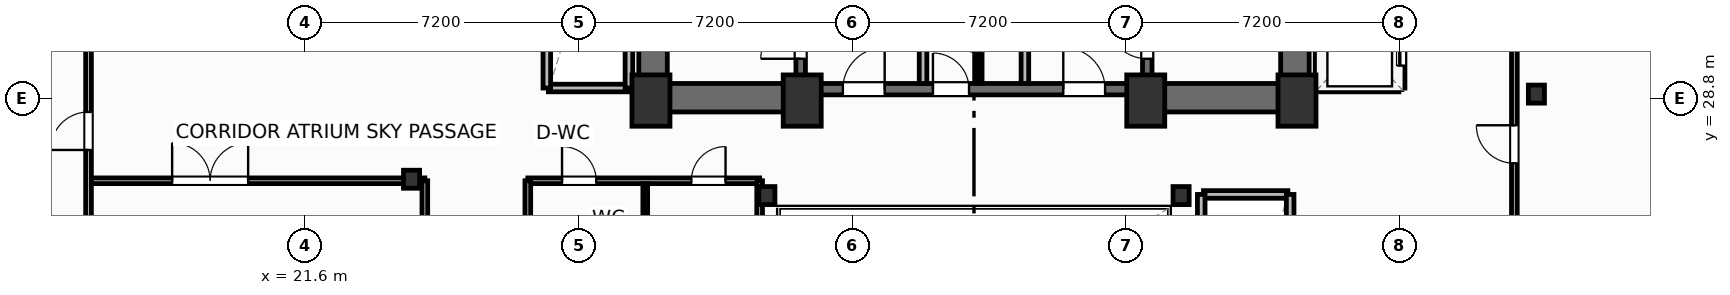
"""IFC4 building model, lengths in metres.
Left out: names, types, materials, properties, quantities, classifications, styles, units other than length and angle.
Written with IfcOpenShell. Run it as: python <this file> out.ifc"""

import sys

from ifc_helpers import new_model, si_unit, direction, frame, frame_2d, origin, origin_2d, place, context, subcontext, project, spatial, rectangle, i_section, extrude, element, fill, save


model = new_model("IFC4")
c1 = context("Model", 3, precision=1e-05, world=origin(), true_north=direction((0.0, 1.0)))
c2 = subcontext(c1, "Body", "Model", "MODEL_VIEW")
j1 = project(units=[si_unit("LENGTHUNIT", "METRE"), si_unit("PLANEANGLEUNIT", "RADIAN")], contexts=[c1])
p1 = place(None, origin())
s1 = spatial("IfcSite", under=j1, at=p1, CompositionType="ELEMENT")
p2 = place(p1, origin())
s2 = spatial("IfcBuilding", under=s1, at=p2, CompositionType="ELEMENT")
p3 = place(p2, frame((0.0, 0.0, 116.9)))
s3 = spatial("IfcBuildingStorey", under=s2, at=p3, CompositionType="ELEMENT", Elevation=116.9)
for number, where, z_axis, x_axis in (
    (1, (30.7, 28.75, 0.0), (0.0, 0.0, 1.0), (1.0, 0.0, 0.0)),
    (2, (34.68, 28.75, 0.0), (0.0, 0.0, 1.0), (1.0, 0.0, 0.0)),
    (3, (43.72, 28.75, 0.0), (0.0, 0.0, 1.0), (1.0, 0.0, 0.0)),
    (4, (47.7, 28.75, 0.0), (0.0, 0.0, 1.0), (1.0, 0.0, 0.0)),
):
    element("IfcColumn", number, at=place(p3, frame(where, z_axis=z_axis, x_axis=x_axis)), inside=s3, PredefinedType="COLUMN", context=c2, shape_type="SweptSolid", body=[
        extrude(rectangle(XDim=1.0, YDim=1.35, at=origin_2d()), origin(), (0.0, 0.0, 1.0), 4.8),
    ])
for number, where, z_axis, x_axis in (
    (5, (33.75, 26.25, 0.0), (0.0, 0.0, 1.0), (1.0, 0.0, 0.0)),
    (6, (44.65, 26.25, 0.0), (0.0, 0.0, 1.0), (1.0, 0.0, 0.0)),
    (7, (24.4, 26.68, 0.0), (0.0, 0.0, 1.0), (1.0, 0.0, 0.0)),
    (8, (54.0, 28.92, 0.0), (0.0, 0.0, 1.0), (1.0, 0.0, 0.0)),
):
    element("IfcColumn", number, at=place(p3, frame(where, z_axis=z_axis, x_axis=x_axis)), inside=s3, PredefinedType="COLUMN", context=c2, shape_type="SweptSolid", body=[
        extrude(i_section(OverallWidth=0.424, OverallDepth=0.474, WebThickness=0.048, FlangeThickness=0.077, FilletRadius=0.025, at=origin_2d()), origin(), (0.0, 0.0, 1.0), 4.8),
    ])
for number, where, z_axis, x_axis in (
    (9, (30.755, 29.2, 0.0), (0.0, 0.0, 1.0), (0.0, 1.0, 0.0)),
    (10, (47.645, 29.2, 0.0), (0.0, 0.0, 1.0), (0.0, 1.0, 0.0)),
):
    element("IfcWall", number, at=place(p3, frame(where, z_axis=z_axis, x_axis=x_axis)), inside=s3, PredefinedType="SHEAR", context=c2, shape_type="SweptSolid", body=[
        extrude(rectangle(XDim=9.22, YDim=0.75, at=frame_2d((4.61, 0.0))), origin(), (0.0, 0.0, 1.0), 4.55),
    ])
p4 = place(p3, frame((30.38, 28.825, 0.0), z_axis=(0.0, 0.0, 1.0), x_axis=(1.0, 0.0, 0.0)))
e11 = element("IfcWall", 11, at=p4, inside=s3, PredefinedType="SHEAR", context=c2, shape_type="SweptSolid", body=[
    extrude(rectangle(XDim=4.42, YDim=0.75, at=frame_2d((2.21, 0.0))), origin(), (0.0, 0.0, 1.0), 4.55),
])
p5 = place(p3, frame((43.6, 28.825, 0.0), z_axis=(0.0, 0.0, 1.0), x_axis=(1.0, 0.0, 0.0)))
e12 = element("IfcWall", 12, at=p5, inside=s3, PredefinedType="SHEAR", context=c2, shape_type="SweptSolid", body=[
    extrude(rectangle(XDim=4.42, YDim=0.75, at=frame_2d((2.21, 0.0))), origin(), (0.0, 0.0, 1.0), 4.55),
])
p6 = place(p3, frame((34.8, 29.05, 0.0), z_axis=(0.0, 0.0, 1.0), x_axis=(1.0, 0.0, 0.0)))
e13 = element("IfcWall", 13, at=p6, inside=s3, PredefinedType="SHEAR", context=c2, shape_type="SweptSolid", body=[
    extrude(rectangle(XDim=8.8, YDim=0.3, at=frame_2d((4.4, 0.0))), origin(), (0.0, 0.0, 1.0), 4.55),
])
p7 = place(p6, frame((0.95, 0.0, 0.0)))
e14 = element("IfcOpeningElement", 14, at=p7, cuts=e13, PredefinedType="OPENING", context=c2, shape_type="SweptSolid", body=[
    extrude(rectangle(XDim=1.1, YDim=2.15, at=frame_2d((0.55, 1.075))), frame((0.0, 0.16, 0.0), z_axis=(0.0, -1.0, 0.0), x_axis=(1.0, 0.0, 0.0)), (0.0, 0.0, 1.0), 0.32),
])
p8 = place(p6, frame((6.75, 0.0, 0.0)))
e15 = element("IfcOpeningElement", 15, at=p8, cuts=e13, PredefinedType="OPENING", context=c2, shape_type="SweptSolid", body=[
    extrude(rectangle(XDim=1.1, YDim=2.15, at=frame_2d((0.55, 1.075))), frame((0.0, 0.16, 0.0), z_axis=(0.0, -1.0, 0.0), x_axis=(1.0, 0.0, 0.0)), (0.0, 0.0, 1.0), 0.32),
])
p9 = place(p6, frame((3.32, 0.0, 0.0)))
e16 = element("IfcOpeningElement", 16, at=p9, cuts=e13, PredefinedType="OPENING", context=c2, shape_type="SweptSolid", body=[
    extrude(rectangle(XDim=0.95, YDim=2.15, at=frame_2d((0.475, 1.075))), frame((0.0, 0.16, 0.0), z_axis=(0.0, -1.0, 0.0), x_axis=(1.0, 0.0, 0.0)), (0.0, 0.0, 1.0), 0.32),
])
p10 = place(p3, frame((34.64, 29.2, 0.0), z_axis=(0.0, 0.0, 1.0), x_axis=(0.0, 1.0, 0.0)))
e17 = element("IfcWall", 17, at=p10, inside=s3, PredefinedType="SHEAR", context=c2, shape_type="SweptSolid", body=[
    extrude(rectangle(XDim=9.22, YDim=0.25, at=frame_2d((4.61, 0.0))), origin(), (0.0, 0.0, 1.0), 4.55),
])
p11 = place(p10, frame((0.65, 0.0, 0.0)))
e18 = element("IfcOpeningElement", 18, at=p11, cuts=e17, PredefinedType="OPENING", context=c2, shape_type="SweptSolid", body=[
    extrude(rectangle(XDim=1.05, YDim=2.15, at=frame_2d((0.525, 1.075))), frame((0.0, 0.135, 0.0), z_axis=(0.0, -1.0, 0.0), x_axis=(1.0, 0.0, 0.0)), (0.0, 0.0, 1.0), 0.27),
])
p12 = place(p3, frame((43.76, 29.2, 0.0), z_axis=(0.0, 0.0, 1.0), x_axis=(0.0, 1.0, 0.0)))
e19 = element("IfcWall", 19, at=p12, inside=s3, PredefinedType="SHEAR", context=c2, shape_type="SweptSolid", body=[
    extrude(rectangle(XDim=9.22, YDim=0.25, at=frame_2d((4.61, 0.0))), origin(), (0.0, 0.0, 1.0), 4.55),
])
p13 = place(p12, frame((0.65, 0.0, 0.0)))
e20 = element("IfcOpeningElement", 20, at=p13, cuts=e19, PredefinedType="OPENING", context=c2, shape_type="SweptSolid", body=[
    extrude(rectangle(XDim=1.05, YDim=2.15, at=frame_2d((0.525, 1.075))), frame((0.0, 0.135, 0.0), z_axis=(0.0, -1.0, 0.0), x_axis=(1.0, 0.0, 0.0)), (0.0, 0.0, 1.0), 0.27),
])
p14 = place(p3, frame((27.46, 26.64, 0.0), z_axis=(0.0, 0.0, 1.0), x_axis=(1.0, 0.0, 0.0)))
e21 = element("IfcWall", 21, at=p14, inside=s3, PredefinedType="PARTITIONING", context=c2, shape_type="SweptSolid", body=[
    extrude(rectangle(XDim=6.1, YDim=0.15, at=frame_2d((3.05, 0.0))), origin(), (0.0, 0.0, 1.0), 3.762),
])
p15 = place(p14, frame((0.9, 0.0, 0.0)))
e22 = element("IfcOpeningElement", 22, at=p15, cuts=e21, PredefinedType="OPENING", context=c2, shape_type="SweptSolid", body=[
    extrude(rectangle(XDim=0.9, YDim=2.05, at=frame_2d((0.45, 1.025))), frame((0.0, 0.085, 0.0), z_axis=(0.0, -1.0, 0.0), x_axis=(1.0, 0.0, 0.0)), (0.0, 0.0, 1.0), 0.17),
])
p16 = place(p14, frame((4.303, 0.0, 0.0)))
e23 = element("IfcOpeningElement", 23, at=p16, cuts=e21, PredefinedType="OPENING", context=c2, shape_type="SweptSolid", body=[
    extrude(rectangle(XDim=0.9, YDim=2.05, at=frame_2d((0.45, 1.025))), frame((0.0, 0.085, 0.0), z_axis=(0.0, -1.0, 0.0), x_axis=(1.0, 0.0, 0.0)), (0.0, 0.0, 1.0), 0.17),
])
p17 = place(p3, frame((30.55, 19.38, 0.0), z_axis=(0.0, 0.0, 1.0), x_axis=(0.0, 1.0, 0.0)))
e24 = element("IfcWall", 24, at=p17, inside=s3, PredefinedType="PARTITIONING", context=c2, shape_type="SweptSolid", body=[
    extrude(rectangle(XDim=7.18, YDim=0.125, at=frame_2d((3.59, 0.0))), origin(), (0.0, 0.0, 1.0), 4.55),
])
p18 = place(p3, frame((27.46, 19.3, 0.0), z_axis=(0.0, 0.0, 1.0), x_axis=(0.0, 1.0, 0.0)))
e25 = element("IfcWall", 25, at=p18, inside=s3, PredefinedType="PARTITIONING", context=c2, shape_type="SweptSolid", body=[
    extrude(rectangle(XDim=7.34, YDim=0.15, at=frame_2d((3.67, 0.0))), origin(), (0.0, 0.0, 1.0), 4.55),
])
p19 = place(p3, frame((33.56, 19.3, 0.0), z_axis=(0.0, 0.0, 1.0), x_axis=(0.0, 1.0, 0.0)))
e26 = element("IfcWall", 26, at=p19, inside=s3, PredefinedType="PARTITIONING", context=c2, shape_type="SweptSolid", body=[
    extrude(rectangle(XDim=7.34, YDim=0.15, at=frame_2d((3.67, 0.0))), origin(), (0.0, 0.0, 1.0), 3.924),
])
p20 = place(p3, frame((15.9, 26.64, 0.0), z_axis=(0.0, 0.0, 1.0), x_axis=(1.0, 0.0, 0.0)))
e27 = element("IfcWall", 27, at=p20, inside=s3, PredefinedType="PARTITIONING", context=c2, shape_type="SweptSolid", body=[
    extrude(rectangle(XDim=8.85, YDim=0.15, at=frame_2d((4.425, 0.0))), origin(), (0.0, 0.0, 1.0), 3.762),
])
p21 = place(p20, frame((2.2, 0.0, 0.0)))
e28 = element("IfcOpeningElement", 28, at=p21, cuts=e27, PredefinedType="OPENING", context=c2, shape_type="SweptSolid", body=[
    extrude(rectangle(XDim=2.0, YDim=2.05, at=frame_2d((1.0, 1.025))), frame((0.0, 0.085, 0.0), z_axis=(0.0, -1.0, 0.0), x_axis=(1.0, 0.0, 0.0)), (0.0, 0.0, 1.0), 0.17),
])
p22 = place(p3, frame((24.75, 19.3, 0.0), z_axis=(0.0, 0.0, 1.0), x_axis=(0.0, 1.0, 0.0)))
e29 = element("IfcWall", 29, at=p22, inside=s3, PredefinedType="PARTITIONING", context=c2, shape_type="SweptSolid", body=[
    extrude(rectangle(XDim=7.34, YDim=0.15, at=frame_2d((3.67, 0.0))), origin(), (0.0, 0.0, 1.0), 4.55),
])
p23 = place(p3, frame((15.9, 6.91, 0.0), z_axis=(0.0, 0.0, 1.0), x_axis=(0.0, 1.0, 0.0)))
e30 = element("IfcWall", 30, at=p23, inside=s3, PredefinedType="PARTITIONING", context=c2, shape_type="SweptSolid", body=[
    extrude(rectangle(XDim=32.41, YDim=0.15, at=frame_2d((16.205, 0.0))), origin(), (0.0, 0.0, 1.0), 4.55),
])
p24 = place(p23, frame((20.54, 0.0, 0.0)))
e31 = element("IfcOpeningElement", 31, at=p24, cuts=e30, PredefinedType="OPENING", context=c2, shape_type="SweptSolid", body=[
    extrude(rectangle(XDim=1.0, YDim=2.05, at=frame_2d((0.5, 1.025))), frame((0.0, 0.085, 0.0), z_axis=(0.0, -1.0, 0.0), x_axis=(1.0, 0.0, 0.0)), (0.0, 0.0, 1.0), 0.17),
])
p25 = place(p3, frame((53.42, 19.3, 0.0), z_axis=(0.0, 0.0, 1.0), x_axis=(0.0, 1.0, 0.0)))
e32 = element("IfcWall", 32, at=p25, inside=s3, PredefinedType="PARTITIONING", context=c2, shape_type="SweptSolid", body=[
    extrude(rectangle(XDim=20.02, YDim=0.15, at=frame_2d((10.01, 0.0))), origin(), (0.0, 0.0, 1.0), 4.55),
])
p26 = place(p25, frame((7.8, 0.0, 0.0)))
e33 = element("IfcOpeningElement", 33, at=p26, cuts=e32, PredefinedType="OPENING", context=c2, shape_type="SweptSolid", body=[
    extrude(rectangle(XDim=1.0, YDim=2.05, at=frame_2d((0.5, 1.025))), frame((0.0, 0.085, 0.0), z_axis=(0.0, -1.0, 0.0), x_axis=(1.0, 0.0, 0.0)), (0.0, 0.0, 1.0), 0.17),
])
for number, where, z_axis, x_axis in (
    (34, (37.86, 29.2, 0.0), (0.0, 0.0, 1.0), (0.0, 1.0, 0.0)),
    (35, (40.54, 29.2, 0.0), (0.0, 0.0, 1.0), (0.0, 1.0, 0.0)),
):
    element("IfcWall", number, at=place(p3, frame(where, z_axis=z_axis, x_axis=x_axis)), inside=s3, PredefinedType="PARTITIONING", context=c2, shape_type="SweptSolid", body=[
        extrude(rectangle(XDim=5.18, YDim=0.2, at=frame_2d((2.59, 0.0))), origin(), (0.0, 0.0, 1.0), 4.55),
    ])
p27 = place(p3, frame((39.35, 29.2, 0.0), z_axis=(0.0, 0.0, 1.0), x_axis=(0.0, 1.0, 0.0)))
e36 = element("IfcWall", 36, at=p27, inside=s3, PredefinedType="PARTITIONING", context=c2, shape_type="SweptSolid", body=[
    extrude(rectangle(XDim=5.22, YDim=0.125, at=frame_2d((2.61, 0.0))), origin(), (0.0, 0.0, 1.0), 4.55),
])
p28 = place(p27, frame((0.8, 0.0, 0.0)))
e37 = element("IfcOpeningElement", 37, at=p28, cuts=e36, PredefinedType="OPENING", context=c2, shape_type="SweptSolid", body=[
    extrude(rectangle(XDim=0.85, YDim=2.05, at=frame_2d((0.425, 1.025))), frame((0.0, 0.073, 0.0), z_axis=(0.0, -1.0, 0.0), x_axis=(1.0, 0.0, 0.0)), (0.0, 0.0, 1.0), 0.145),
])
p29 = place(p27, frame((3.4, 0.0, 0.0)))
e38 = element("IfcOpeningElement", 38, at=p29, cuts=e36, PredefinedType="OPENING", context=c2, shape_type="SweptSolid", body=[
    extrude(rectangle(XDim=0.85, YDim=2.05, at=frame_2d((0.425, 1.025))), frame((0.0, 0.073, 0.0), z_axis=(0.0, -1.0, 0.0), x_axis=(1.0, 0.0, 0.0)), (0.0, 0.0, 1.0), 0.145),
])
p30 = place(p3, frame((28.0, 29.08, 0.0), z_axis=(0.0, 0.0, 1.0), x_axis=(1.0, 0.0, 0.0)))
e39 = element("IfcWall", 39, at=p30, inside=s3, PredefinedType="PARTITIONING", context=c2, shape_type="SweptSolid", body=[
    extrude(rectangle(XDim=2.1, YDim=0.2, at=frame_2d((1.05, 0.0))), origin(), (0.0, 0.0, 1.0), 4.55),
])
for number, where, z_axis, x_axis in (
    (40, (30.12, 29.08, 0.0), (0.0, 0.0, 1.0), (0.0, 1.0, 0.0)),
    (41, (27.96, 29.08, 0.0), (0.0, 0.0, 1.0), (0.0, 1.0, 0.0)),
):
    element("IfcWall", number, at=place(p3, frame(where, z_axis=z_axis, x_axis=x_axis)), inside=s3, PredefinedType="PARTITIONING", context=c2, shape_type="SweptSolid", body=[
        extrude(rectangle(XDim=6.89, YDim=0.2, at=frame_2d((3.445, 0.0))), origin(), (0.0, 0.0, 1.0), 4.55),
    ])
p31 = place(p3, frame((48.32, 29.08, 0.0), z_axis=(0.0, 0.0, 1.0), x_axis=(1.0, 0.0, 0.0)))
e42 = element("IfcWall", 42, at=p31, inside=s3, PredefinedType="PARTITIONING", context=c2, shape_type="SweptSolid", body=[
    extrude(rectangle(XDim=2.06, YDim=0.2, at=frame_2d((1.03, 0.0))), origin(), (0.0, 0.0, 1.0), 3.762),
])
p32 = place(p3, frame((48.28, 29.08, 0.0), z_axis=(0.0, 0.0, 1.0), x_axis=(0.0, 1.0, 0.0)))
e43 = element("IfcWall", 43, at=p32, inside=s3, PredefinedType="PARTITIONING", context=c2, shape_type="SweptSolid", body=[
    extrude(rectangle(XDim=6.89, YDim=0.2, at=frame_2d((3.445, 0.0))), origin(), (0.0, 0.0, 1.0), 4.55),
])
p33 = place(p3, frame((50.44, 29.08, 0.0), z_axis=(0.0, 0.0, 1.0), x_axis=(0.0, 1.0, 0.0)))
e44 = element("IfcWall", 44, at=p33, inside=s3, PredefinedType="PARTITIONING", context=c2, shape_type="SweptSolid", body=[
    extrude(rectangle(XDim=6.89, YDim=0.2, at=frame_2d((3.445, 0.0))), origin(), (0.0, 0.0, 1.0), 4.55),
])
p34 = place(p33, frame((0.59, 0.0, 0.0)))
e45 = element("IfcOpeningElement", 45, at=p34, cuts=e44, PredefinedType="OPENING", context=c2, shape_type="SweptSolid", body=[
    extrude(rectangle(XDim=1.1, YDim=2.15, at=frame_2d((0.55, 1.075))), frame((0.0, 0.11, 0.0), z_axis=(0.0, -1.0, 0.0), x_axis=(1.0, 0.0, 0.0)), (0.0, 0.0, 1.0), 0.22),
])
p35 = place(p33, frame((2.89, 0.0, 0.0)))
e46 = element("IfcOpeningElement", 46, at=p35, cuts=e44, PredefinedType="OPENING", context=c2, shape_type="SweptSolid", body=[
    extrude(rectangle(XDim=1.1, YDim=2.15, at=frame_2d((0.55, 1.075))), frame((0.0, 0.11, 0.0), z_axis=(0.0, -1.0, 0.0), x_axis=(1.0, 0.0, 0.0)), (0.0, 0.0, 1.0), 0.22),
])
p36 = place(p33, frame((5.19, 0.0, 0.0)))
e47 = element("IfcOpeningElement", 47, at=p36, cuts=e44, PredefinedType="OPENING", context=c2, shape_type="SweptSolid", body=[
    extrude(rectangle(XDim=1.1, YDim=2.15, at=frame_2d((0.55, 1.075))), frame((0.0, 0.11, 0.0), z_axis=(0.0, -1.0, 0.0), x_axis=(1.0, 0.0, 0.0)), (0.0, 0.0, 1.0), 0.22),
])
p37 = place(p3, frame((45.24, 26.28, 0.0), z_axis=(0.0, 0.0, 1.0), x_axis=(1.0, 0.0, 0.0)))
e48 = element("IfcWall", 48, at=p37, inside=s3, PredefinedType="PARTITIONING", context=c2, shape_type="SweptSolid", body=[
    extrude(rectangle(XDim=2.22, YDim=0.2, at=frame_2d((1.11, 0.0))), origin(), (0.0, 0.0, 1.0), 4.55),
])
for number, where, z_axis, x_axis in (
    (49, (45.18, 19.38, 0.0), (0.0, 0.0, 1.0), (0.0, 1.0, 0.0)),
    (50, (47.52, 19.38, 0.0), (0.0, 0.0, 1.0), (0.0, 1.0, 0.0)),
):
    element("IfcWall", number, at=place(p3, frame(where, z_axis=z_axis, x_axis=x_axis)), inside=s3, PredefinedType="PARTITIONING", context=c2, shape_type="SweptSolid", body=[
        extrude(rectangle(XDim=6.9, YDim=0.2, at=frame_2d((3.45, 0.0))), origin(), (0.0, 0.0, 1.0), 4.55),
    ])
p38 = place(p15, origin())
e51 = element("IfcDoor", 51, at=p38, inside=s3, OperationType="SINGLE_SWING_LEFT", PredefinedType="DOOR", context=c2, shape_type="SweptSolid", body=[
    extrude(rectangle(XDim=0.9, YDim=2.05, at=frame_2d((0.45, 1.025))), frame((0.0, 0.025, 0.0), z_axis=(0.0, -1.0, 0.0), x_axis=(1.0, 0.0, 0.0)), (0.0, 0.0, 1.0), 0.05),
])
fill(e22, e51)
p39 = place(p16, origin())
e52 = element("IfcDoor", 52, at=p39, inside=s3, OperationType="SINGLE_SWING_RIGHT", PredefinedType="DOOR", context=c2, shape_type="SweptSolid", body=[
    extrude(rectangle(XDim=0.9, YDim=2.05, at=frame_2d((0.45, 1.025))), frame((0.0, 0.025, 0.0), z_axis=(0.0, -1.0, 0.0), x_axis=(1.0, 0.0, 0.0)), (0.0, 0.0, 1.0), 0.05),
])
fill(e23, e52)
p40 = place(p21, origin())
e53 = element("IfcDoor", 53, at=p40, inside=s3, OperationType="DOUBLE_DOOR_SINGLE_SWING", PredefinedType="DOOR", context=c2, shape_type="SweptSolid", body=[
    extrude(rectangle(XDim=2.0, YDim=2.05, at=frame_2d((1.0, 1.025))), frame((0.0, 0.025, 0.0), z_axis=(0.0, -1.0, 0.0), x_axis=(1.0, 0.0, 0.0)), (0.0, 0.0, 1.0), 0.05),
])
fill(e28, e53)
p41 = place(p24, origin())
e54 = element("IfcDoor", 54, at=p41, inside=s3, OperationType="SINGLE_SWING_LEFT", PredefinedType="DOOR", context=c2, shape_type="SweptSolid", body=[
    extrude(rectangle(XDim=1.0, YDim=2.05, at=frame_2d((0.5, 1.025))), frame((0.0, 0.025, 0.0), z_axis=(0.0, -1.0, 0.0), x_axis=(1.0, 0.0, 0.0)), (0.0, 0.0, 1.0), 0.05),
])
fill(e31, e54)
p42 = place(p26, origin())
e55 = element("IfcDoor", 55, at=p42, inside=s3, OperationType="SINGLE_SWING_RIGHT", PredefinedType="DOOR", context=c2, shape_type="SweptSolid", body=[
    extrude(rectangle(XDim=1.0, YDim=2.05, at=frame_2d((0.5, 1.025))), frame((0.0, 0.025, 0.0), z_axis=(0.0, -1.0, 0.0), x_axis=(1.0, 0.0, 0.0)), (0.0, 0.0, 1.0), 0.05),
])
fill(e33, e55)
p43 = place(p11, origin())
e56 = element("IfcDoor", 56, at=p43, inside=s3, OperationType="SINGLE_SWING_LEFT", PredefinedType="DOOR", context=c2, shape_type="SweptSolid", body=[
    extrude(rectangle(XDim=1.05, YDim=2.15, at=frame_2d((0.525, 1.075))), frame((0.0, 0.025, 0.0), z_axis=(0.0, -1.0, 0.0), x_axis=(1.0, 0.0, 0.0)), (0.0, 0.0, 1.0), 0.05),
])
fill(e18, e56)
p44 = place(p13, origin())
e57 = element("IfcDoor", 57, at=p44, inside=s3, OperationType="SINGLE_SWING_RIGHT", PredefinedType="DOOR", context=c2, shape_type="SweptSolid", body=[
    extrude(rectangle(XDim=1.05, YDim=2.15, at=frame_2d((0.525, 1.075))), frame((0.0, 0.025, 0.0), z_axis=(0.0, -1.0, 0.0), x_axis=(1.0, 0.0, 0.0)), (0.0, 0.0, 1.0), 0.05),
])
fill(e20, e57)
p45 = place(p7, origin())
e58 = element("IfcDoor", 58, at=p45, inside=s3, OperationType="SINGLE_SWING_RIGHT", PredefinedType="DOOR", context=c2, shape_type="SweptSolid", body=[
    extrude(rectangle(XDim=1.1, YDim=2.15, at=frame_2d((0.55, 1.075))), frame((0.0, 0.025, 0.0), z_axis=(0.0, -1.0, 0.0), x_axis=(1.0, 0.0, 0.0)), (0.0, 0.0, 1.0), 0.05),
])
fill(e14, e58)
p46 = place(p8, origin())
e59 = element("IfcDoor", 59, at=p46, inside=s3, OperationType="SINGLE_SWING_LEFT", PredefinedType="DOOR", context=c2, shape_type="SweptSolid", body=[
    extrude(rectangle(XDim=1.1, YDim=2.15, at=frame_2d((0.55, 1.075))), frame((0.0, 0.025, 0.0), z_axis=(0.0, -1.0, 0.0), x_axis=(1.0, 0.0, 0.0)), (0.0, 0.0, 1.0), 0.05),
])
fill(e15, e59)
p47 = place(p28, origin())
e60 = element("IfcDoor", 60, at=p47, inside=s3, OperationType="SINGLE_SWING_RIGHT", PredefinedType="DOOR", context=c2, shape_type="SweptSolid", body=[
    extrude(rectangle(XDim=0.85, YDim=2.05, at=frame_2d((0.425, 1.025))), frame((0.0, 0.025, 0.0), z_axis=(0.0, -1.0, 0.0), x_axis=(1.0, 0.0, 0.0)), (0.0, 0.0, 1.0), 0.05),
])
fill(e37, e60)
p48 = place(p9, origin())
e61 = element("IfcDoor", 61, at=p48, inside=s3, OperationType="SINGLE_SWING_LEFT", PredefinedType="DOOR", context=c2, shape_type="SweptSolid", body=[
    extrude(rectangle(XDim=0.95, YDim=2.15, at=frame_2d((0.475, 1.075))), frame((0.0, 0.025, 0.0), z_axis=(0.0, -1.0, 0.0), x_axis=(1.0, 0.0, 0.0)), (0.0, 0.0, 1.0), 0.05),
])
fill(e16, e61)
p49 = place(p34, origin())
e62 = element("IfcDoor", 62, at=p49, inside=s3, OperationType="SLIDING_TO_LEFT", PredefinedType="DOOR", context=c2, shape_type="SweptSolid", body=[
    extrude(rectangle(XDim=1.1, YDim=2.15, at=frame_2d((0.55, 1.075))), frame((0.0, 0.025, 0.0), z_axis=(0.0, -1.0, 0.0), x_axis=(1.0, 0.0, 0.0)), (0.0, 0.0, 1.0), 0.05),
])
fill(e45, e62)
save(model, sys.argv[1])
